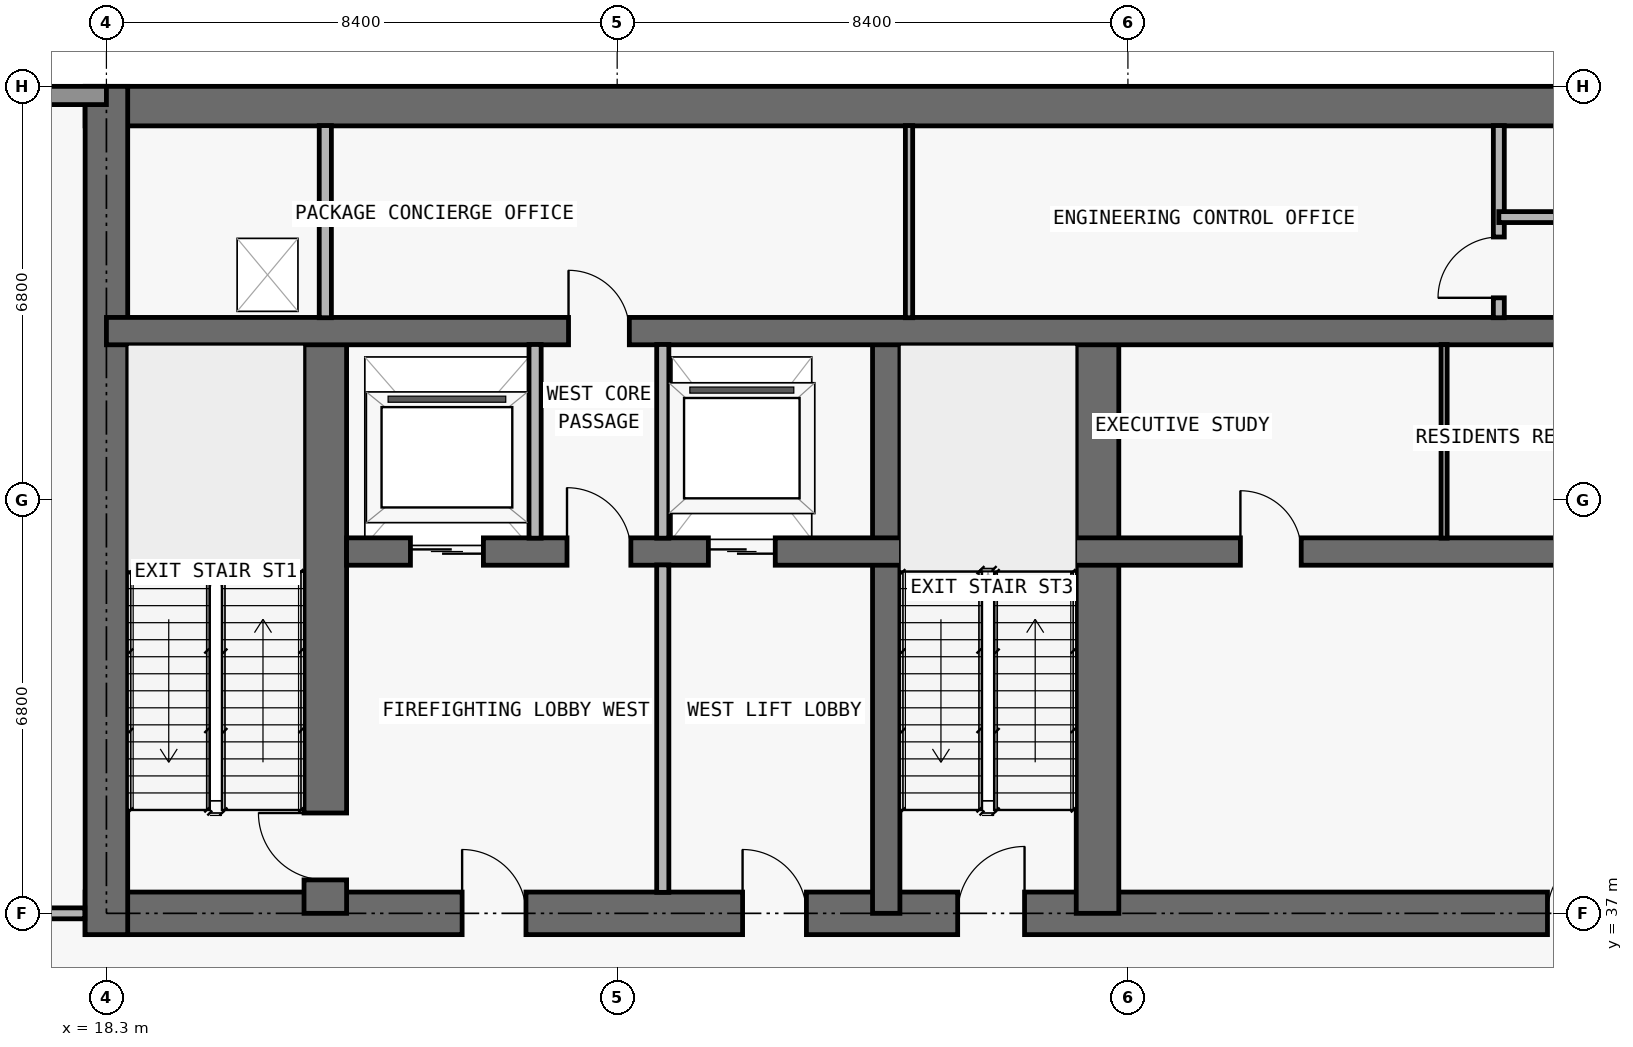
"""IFC4 building model, lengths in metres.
Left out: names, types, materials, properties, quantities, classifications, styles, units other than length and angle.
Written with IfcOpenShell. Run it as: python <this file> out.ifc"""

import sys

from ifc_helpers import new_model, si_unit, direction, frame, frame_2d, origin, place, context, subcontext, project, spatial, rectangle, extrude, element, fill, save


model = new_model("IFC4")
c1 = context("Model", 3, precision=1e-05, world=origin(), true_north=direction((0.0, 1.0)))
c2 = subcontext(c1, "Body", "Model", "MODEL_VIEW")
j1 = project(units=[si_unit("LENGTHUNIT", "METRE"), si_unit("PLANEANGLEUNIT", "RADIAN")], contexts=[c1])
p1 = place(None, origin())
s1 = spatial("IfcSite", under=j1, at=p1, CompositionType="ELEMENT")
p2 = place(p1, origin())
s2 = spatial("IfcBuilding", under=s1, at=p2, CompositionType="ELEMENT")
p3 = place(p2, frame((0.0, 0.0, 221.4)))
s3 = spatial("IfcBuildingStorey", under=s2, at=p3, CompositionType="ELEMENT", Elevation=221.4)
p4 = place(p3, frame((17.95, 37.0, 0.0), z_axis=(0.0, 0.0, 1.0), x_axis=(1.0, 0.0, 0.0)))
e1 = element("IfcWall", 1, at=p4, inside=s3, PredefinedType="SHEAR", context=c2, shape_type="SweptSolid", body=[
    extrude(rectangle(XDim=41.9, YDim=0.7, at=frame_2d((20.95, 0.0))), origin(), (0.0, 0.0, 1.0), 4.85),
])
p5 = place(p4, frame((14.35, 0.0, 0.0)))
e2 = element("IfcOpeningElement", 2, at=p5, cuts=e1, PredefinedType="OPENING", context=c2, shape_type="SweptSolid", body=[
    extrude(rectangle(XDim=1.1, YDim=2.15, at=frame_2d((0.55, 1.075))), frame((0.0, 0.36, 0.0), z_axis=(0.0, -1.0, 0.0), x_axis=(1.0, 0.0, 0.0)), (0.0, 0.0, 1.0), 0.72),
])
p6 = place(p4, frame((6.2, 0.0, 0.0)))
e3 = element("IfcOpeningElement", 3, at=p6, cuts=e1, PredefinedType="OPENING", context=c2, shape_type="SweptSolid", body=[
    extrude(rectangle(XDim=1.05, YDim=2.15, at=frame_2d((0.525, 1.075))), frame((0.0, 0.36, 0.0), z_axis=(0.0, -1.0, 0.0), x_axis=(1.0, 0.0, 0.0)), (0.0, 0.0, 1.0), 0.72),
])
p7 = place(p4, frame((34.7, 0.0, 0.0)))
e4 = element("IfcOpeningElement", 4, at=p7, cuts=e1, PredefinedType="OPENING", context=c2, shape_type="SweptSolid", body=[
    extrude(rectangle(XDim=1.05, YDim=2.15, at=frame_2d((0.525, 1.075))), frame((0.0, 0.36, 0.0), z_axis=(0.0, -1.0, 0.0), x_axis=(1.0, 0.0, 0.0)), (0.0, 0.0, 1.0), 0.72),
])
p8 = place(p4, frame((10.812, 0.0, 0.0)))
e5 = element("IfcOpeningElement", 5, at=p8, cuts=e1, PredefinedType="OPENING", context=c2, shape_type="SweptSolid", body=[
    extrude(rectangle(XDim=1.05, YDim=2.15, at=frame_2d((0.525, 1.075))), frame((0.0, 0.36, 0.0), z_axis=(0.0, -1.0, 0.0), x_axis=(1.0, 0.0, 0.0)), (0.0, 0.0, 1.0), 0.72),
])
p9 = place(p4, frame((24.05, 0.0, 0.0)))
e6 = element("IfcOpeningElement", 6, at=p9, cuts=e1, PredefinedType="OPENING", context=c2, shape_type="SweptSolid", body=[
    extrude(rectangle(XDim=1.05, YDim=2.15, at=frame_2d((0.525, 1.075))), frame((0.0, 0.36, 0.0), z_axis=(0.0, -1.0, 0.0), x_axis=(1.0, 0.0, 0.0)), (0.0, 0.0, 1.0), 0.72),
])
p10 = place(p3, frame((17.95, 50.275, 0.0), z_axis=(0.0, 0.0, 1.0), x_axis=(1.0, 0.0, 0.0)))
e7 = element("IfcWall", 7, at=p10, inside=s3, PredefinedType="SHEAR", context=c2, shape_type="SweptSolid", body=[
    extrude(rectangle(XDim=41.9, YDim=0.65, at=frame_2d((20.95, 0.0))), origin(), (0.0, 0.0, 1.0), 4.85),
])
p11 = place(p3, frame((18.3, 36.65, 0.0), z_axis=(0.0, 0.0, 1.0), x_axis=(0.0, 1.0, 0.0)))
e8 = element("IfcWall", 8, at=p11, inside=s3, PredefinedType="SHEAR", context=c2, shape_type="SweptSolid", body=[
    extrude(rectangle(XDim=13.95, YDim=0.7, at=frame_2d((6.975, 0.0))), origin(), (0.0, 0.0, 1.0), 4.85),
])
p12 = place(p3, frame((21.9, 37.0, 0.0), z_axis=(0.0, 0.0, 1.0), x_axis=(0.0, 1.0, 0.0)))
e9 = element("IfcWall", 9, at=p12, inside=s3, PredefinedType="SHEAR", context=c2, shape_type="SweptSolid", body=[
    extrude(rectangle(XDim=9.575, YDim=0.7, at=frame_2d((4.788, 0.0))), origin(), (0.0, 0.0, 1.0), 4.85),
])
p13 = place(p12, frame((0.55, 0.0, 0.0)))
e10 = element("IfcOpeningElement", 10, at=p13, cuts=e9, PredefinedType="OPENING", context=c2, shape_type="SweptSolid", body=[
    extrude(rectangle(XDim=1.1, YDim=2.15, at=frame_2d((0.55, 1.075))), frame((0.0, 0.36, 0.0), z_axis=(0.0, -1.0, 0.0), x_axis=(1.0, 0.0, 0.0)), (0.0, 0.0, 1.0), 0.72),
])
p14 = place(p3, frame((31.125, 37.0, 0.0), z_axis=(0.0, 0.0, 1.0), x_axis=(0.0, 1.0, 0.0)))
e11 = element("IfcWall", 11, at=p14, inside=s3, PredefinedType="SHEAR", context=c2, shape_type="SweptSolid", body=[
    extrude(rectangle(XDim=9.575, YDim=0.45, at=frame_2d((4.788, 0.0))), origin(), (0.0, 0.0, 1.0), 4.85),
])
p15 = place(p3, frame((34.6, 37.0, 0.0), z_axis=(0.0, 0.0, 1.0), x_axis=(0.0, 1.0, 0.0)))
e12 = element("IfcWall", 12, at=p15, inside=s3, PredefinedType="SHEAR", context=c2, shape_type="SweptSolid", body=[
    extrude(rectangle(XDim=9.575, YDim=0.7, at=frame_2d((4.788, 0.0))), origin(), (0.0, 0.0, 1.0), 4.85),
])
p16 = place(p3, frame((22.25, 42.95, 0.0), z_axis=(0.0, 0.0, 1.0), x_axis=(1.0, 0.0, 0.0)))
e13 = element("IfcWall", 13, at=p16, inside=s3, PredefinedType="SHEAR", context=c2, shape_type="SweptSolid", body=[
    extrude(rectangle(XDim=33.3, YDim=0.45, at=frame_2d((16.65, 0.0))), origin(), (0.0, 0.0, 1.0), 4.85),
])
p17 = place(p16, frame((1.05, 0.0, 0.0)))
e14 = element("IfcOpeningElement", 14, at=p17, cuts=e13, PredefinedType="OPENING", context=c2, shape_type="SweptSolid", body=[
    extrude(rectangle(XDim=1.2, YDim=2.2, at=frame_2d((0.6, 1.1))), frame((0.0, 0.235, 0.0), z_axis=(0.0, -1.0, 0.0), x_axis=(1.0, 0.0, 0.0)), (0.0, 0.0, 1.0), 0.47),
])
p18 = place(p16, frame((31.05, 0.0, 0.0)))
e15 = element("IfcOpeningElement", 15, at=p18, cuts=e13, PredefinedType="OPENING", context=c2, shape_type="SweptSolid", body=[
    extrude(rectangle(XDim=1.2, YDim=2.2, at=frame_2d((0.6, 1.1))), frame((0.0, 0.235, 0.0), z_axis=(0.0, -1.0, 0.0), x_axis=(1.0, 0.0, 0.0)), (0.0, 0.0, 1.0), 0.47),
])
p19 = place(p16, frame((26.45, 0.0, 0.0)))
e16 = element("IfcOpeningElement", 16, at=p19, cuts=e13, PredefinedType="OPENING", context=c2, shape_type="SweptSolid", body=[
    extrude(rectangle(XDim=1.1, YDim=2.2, at=frame_2d((0.55, 1.1))), frame((0.0, 0.235, 0.0), z_axis=(0.0, -1.0, 0.0), x_axis=(1.0, 0.0, 0.0)), (0.0, 0.0, 1.0), 0.47),
])
p20 = place(p16, frame((5.95, 0.0, 0.0)))
e17 = element("IfcOpeningElement", 17, at=p20, cuts=e13, PredefinedType="OPENING", context=c2, shape_type="SweptSolid", body=[
    extrude(rectangle(XDim=1.1, YDim=2.2, at=frame_2d((0.55, 1.1))), frame((0.0, 0.235, 0.0), z_axis=(0.0, -1.0, 0.0), x_axis=(1.0, 0.0, 0.0)), (0.0, 0.0, 1.0), 0.47),
])
p21 = place(p16, frame((3.625, 0.0, 0.0)))
e18 = element("IfcOpeningElement", 18, at=p21, cuts=e13, PredefinedType="OPENING", context=c2, shape_type="SweptSolid", body=[
    extrude(rectangle(XDim=1.05, YDim=2.15, at=frame_2d((0.525, 1.075))), frame((0.0, 0.235, 0.0), z_axis=(0.0, -1.0, 0.0), x_axis=(1.0, 0.0, 0.0)), (0.0, 0.0, 1.0), 0.47),
])
p22 = place(p16, frame((28.675, 0.0, 0.0)))
e19 = element("IfcOpeningElement", 19, at=p22, cuts=e13, PredefinedType="OPENING", context=c2, shape_type="SweptSolid", body=[
    extrude(rectangle(XDim=1.05, YDim=2.15, at=frame_2d((0.525, 1.075))), frame((0.0, 0.235, 0.0), z_axis=(0.0, -1.0, 0.0), x_axis=(1.0, 0.0, 0.0)), (0.0, 0.0, 1.0), 0.47),
])
p23 = place(p16, frame((14.7, 0.0, 0.0)))
e20 = element("IfcOpeningElement", 20, at=p23, cuts=e13, PredefinedType="OPENING", context=c2, shape_type="SweptSolid", body=[
    extrude(rectangle(XDim=1.0, YDim=2.2, at=frame_2d((0.5, 1.1))), frame((0.0, 0.235, 0.0), z_axis=(0.0, -1.0, 0.0), x_axis=(1.0, 0.0, 0.0)), (0.0, 0.0, 1.0), 0.47),
])
p24 = place(p16, frame((21.45, 0.0, 0.0)))
e21 = element("IfcOpeningElement", 21, at=p24, cuts=e13, PredefinedType="OPENING", context=c2, shape_type="SweptSolid", body=[
    extrude(rectangle(XDim=1.0, YDim=2.2, at=frame_2d((0.5, 1.1))), frame((0.0, 0.235, 0.0), z_axis=(0.0, -1.0, 0.0), x_axis=(1.0, 0.0, 0.0)), (0.0, 0.0, 1.0), 0.47),
])
p25 = place(p3, frame((18.3, 46.575, 0.0), z_axis=(0.0, 0.0, 1.0), x_axis=(1.0, 0.0, 0.0)))
e22 = element("IfcWall", 22, at=p25, inside=s3, PredefinedType="SHEAR", context=c2, shape_type="SweptSolid", body=[
    extrude(rectangle(XDim=41.2, YDim=0.45, at=frame_2d((20.6, 0.0))), origin(), (0.0, 0.0, 1.0), 4.85),
])
p26 = place(p25, frame((7.6, 0.0, 0.0)))
e23 = element("IfcOpeningElement", 23, at=p26, cuts=e22, PredefinedType="OPENING", context=c2, shape_type="SweptSolid", body=[
    extrude(rectangle(XDim=1.0, YDim=2.2, at=frame_2d((0.5, 1.1))), frame((0.0, 0.235, 0.0), z_axis=(0.0, -1.0, 0.0), x_axis=(1.0, 0.0, 0.0)), (0.0, 0.0, 1.0), 0.47),
])
p27 = place(p25, frame((32.625, 0.0, 0.0)))
e24 = element("IfcOpeningElement", 24, at=p27, cuts=e22, PredefinedType="OPENING", context=c2, shape_type="SweptSolid", body=[
    extrude(rectangle(XDim=1.05, YDim=2.15, at=frame_2d((0.525, 1.075))), frame((0.0, 0.235, 0.0), z_axis=(0.0, -1.0, 0.0), x_axis=(1.0, 0.0, 0.0)), (0.0, 0.0, 1.0), 0.47),
])
p28 = place(p3, frame((10.1, 50.45, 0.0), z_axis=(0.0, 0.0, 1.0), x_axis=(1.0, 0.0, 0.0)))
e25 = element("IfcWall", 25, at=p28, inside=s3, PredefinedType="STANDARD", context=c2, shape_type="SweptSolid", body=[
    extrude(rectangle(XDim=8.2, YDim=0.3, at=frame_2d((4.1, 0.0))), origin(), (0.0, 0.0, 1.0), 4.85),
])
p29 = place(p28, frame((3.0, 0.0, 0.85)))
e26 = element("IfcOpeningElement", 26, at=p29, cuts=e25, PredefinedType="OPENING", context=c2, shape_type="SweptSolid", body=[
    extrude(rectangle(XDim=2.2, YDim=1.55, at=frame_2d((1.1, 0.775))), frame((0.0, 0.16, 0.0), z_axis=(0.0, -1.0, 0.0), x_axis=(1.0, 0.0, 0.0)), (0.0, 0.0, 1.0), 0.32),
])
p30 = place(p3, frame((21.9, 46.795, 0.0), z_axis=(0.0, 0.0, 1.0), x_axis=(0.0, 1.0, 0.0)))
e27 = element("IfcWall", 27, at=p30, inside=s3, PredefinedType="PARTITIONING", context=c2, shape_type="SweptSolid", body=[
    extrude(rectangle(XDim=3.16, YDim=0.2, at=frame_2d((1.58, 0.0))), origin(), (0.0, 0.0, 1.0), 4.85),
])
p31 = place(p3, frame((25.35, 43.17, 0.0), z_axis=(0.0, 0.0, 1.0), x_axis=(0.0, 1.0, 0.0)))
e28 = element("IfcWall", 28, at=p31, inside=s3, PredefinedType="PARTITIONING", context=c2, shape_type="SweptSolid", body=[
    extrude(rectangle(XDim=3.185, YDim=0.2, at=frame_2d((1.593, 0.0))), origin(), (0.0, 0.0, 1.0), 4.85),
])
p32 = place(p3, frame((27.45, 37.345, 0.0), z_axis=(0.0, 0.0, 1.0), x_axis=(0.0, 1.0, 0.0)))
e29 = element("IfcWall", 29, at=p32, inside=s3, PredefinedType="PARTITIONING", context=c2, shape_type="SweptSolid", body=[
    extrude(rectangle(XDim=5.385, YDim=0.2, at=frame_2d((2.692, 0.0))), origin(), (0.0, 0.0, 1.0), 4.85),
])
p33 = place(p3, frame((27.45, 43.17, 0.0), z_axis=(0.0, 0.0, 1.0), x_axis=(0.0, 1.0, 0.0)))
e30 = element("IfcWall", 30, at=p33, inside=s3, PredefinedType="PARTITIONING", context=c2, shape_type="SweptSolid", body=[
    extrude(rectangle(XDim=3.185, YDim=0.2, at=frame_2d((1.593, 0.0))), origin(), (0.0, 0.0, 1.0), 4.85),
])
p34 = place(p3, frame((31.5, 46.795, 0.0), z_axis=(0.0, 0.0, 1.0), x_axis=(0.0, 1.0, 0.0)))
e31 = element("IfcWall", 31, at=p34, inside=s3, PredefinedType="PARTITIONING", context=c2, shape_type="SweptSolid", body=[
    extrude(rectangle(XDim=3.16, YDim=0.12, at=frame_2d((1.58, 0.0))), origin(), (0.0, 0.0, 1.0), 4.85),
])
p35 = place(p3, frame((40.3, 43.17, 0.0), z_axis=(0.0, 0.0, 1.0), x_axis=(0.0, 1.0, 0.0)))
e32 = element("IfcWall", 32, at=p35, inside=s3, PredefinedType="MOVABLE", context=c2, shape_type="SweptSolid", body=[
    extrude(rectangle(XDim=3.185, YDim=0.1, at=frame_2d((1.593, 0.0))), origin(), (0.0, 0.0, 1.0), 4.85),
])
p36 = place(p3, frame((41.2, 46.795, 0.0), z_axis=(0.0, 0.0, 1.0), x_axis=(0.0, 1.0, 0.0)))
e33 = element("IfcWall", 33, at=p36, inside=s3, PredefinedType="PARTITIONING", context=c2, shape_type="SweptSolid", body=[
    extrude(rectangle(XDim=3.16, YDim=0.18, at=frame_2d((1.58, 0.0))), origin(), (0.0, 0.0, 1.0), 4.85),
])
p37 = place(p36, frame((0.327, 0.0, 0.0)))
e34 = element("IfcOpeningElement", 34, at=p37, cuts=e33, PredefinedType="OPENING", context=c2, shape_type="SweptSolid", body=[
    extrude(rectangle(XDim=1.0, YDim=2.2, at=frame_2d((0.5, 1.1))), frame((0.0, 0.1, 0.0), z_axis=(0.0, -1.0, 0.0), x_axis=(1.0, 0.0, 0.0)), (0.0, 0.0, 1.0), 0.2),
])
p38 = place(p3, frame((10.1, 37.0, 0.0), z_axis=(0.0, 0.0, 1.0), x_axis=(1.0, 0.0, 0.0)))
e35 = element("IfcWall", 35, at=p38, inside=s3, PredefinedType="PARTITIONING", context=c2, shape_type="SweptSolid", body=[
    extrude(rectangle(XDim=7.845, YDim=0.18, at=frame_2d((3.922, 0.0))), origin(), (0.0, 0.0, 1.0), 4.85),
])
p39 = place(p38, frame((3.323, 0.0, 0.0)))
e36 = element("IfcOpeningElement", 36, at=p39, cuts=e35, PredefinedType="OPENING", context=c2, shape_type="SweptSolid", body=[
    extrude(rectangle(XDim=1.2, YDim=2.2, at=frame_2d((0.6, 1.1))), frame((0.0, 0.1, 0.0), z_axis=(0.0, -1.0, 0.0), x_axis=(1.0, 0.0, 0.0)), (0.0, 0.0, 1.0), 0.2),
])
p40 = place(p3, frame((41.2, 48.45, 0.0), z_axis=(0.0, 0.0, 1.0), x_axis=(1.0, 0.0, 0.0)))
e37 = element("IfcWall", 37, at=p40, inside=s3, PredefinedType="PARTITIONING", context=c2, shape_type="SweptSolid", body=[
    extrude(rectangle(XDim=14.7, YDim=0.18, at=frame_2d((7.35, 0.0))), origin(), (0.0, 0.0, 1.0), 4.85),
])
p41 = place(p40, frame((1.85, 0.0, 0.0)))
e38 = element("IfcOpeningElement", 38, at=p41, cuts=e37, PredefinedType="OPENING", context=c2, shape_type="SweptSolid", body=[
    extrude(rectangle(XDim=1.2, YDim=2.2, at=frame_2d((0.6, 1.1))), frame((0.0, 0.1, 0.0), z_axis=(0.0, -1.0, 0.0), x_axis=(1.0, 0.0, 0.0)), (0.0, 0.0, 1.0), 0.2),
])
p42 = place(p40, frame((6.75, 0.0, 0.0)))
e39 = element("IfcOpeningElement", 39, at=p42, cuts=e37, PredefinedType="OPENING", context=c2, shape_type="SweptSolid", body=[
    extrude(rectangle(XDim=1.2, YDim=2.2, at=frame_2d((0.6, 1.1))), frame((0.0, 0.1, 0.0), z_axis=(0.0, -1.0, 0.0), x_axis=(1.0, 0.0, 0.0)), (0.0, 0.0, 1.0), 0.2),
])
p43 = place(p40, frame((11.825, 0.0, 0.0)))
e40 = element("IfcOpeningElement", 40, at=p43, cuts=e37, PredefinedType="OPENING", context=c2, shape_type="SweptSolid", body=[
    extrude(rectangle(XDim=0.85, YDim=2.1, at=frame_2d((0.425, 1.05))), frame((0.0, 0.1, 0.0), z_axis=(0.0, -1.0, 0.0), x_axis=(1.0, 0.0, 0.0)), (0.0, 0.0, 1.0), 0.2),
])
p44 = place(p17, origin())
e41 = element("IfcDoor", 41, at=p44, inside=s3, OperationType="DOUBLE_DOOR_SLIDING", PredefinedType="DOOR", context=c2, shape_type="SweptSolid", body=[
    extrude(rectangle(XDim=1.2, YDim=2.2, at=frame_2d((0.6, 1.1))), frame((0.0, 0.025, 0.0), z_axis=(0.0, -1.0, 0.0), x_axis=(1.0, 0.0, 0.0)), (0.0, 0.0, 1.0), 0.05),
])
fill(e14, e41)
p45 = place(p20, origin())
e42 = element("IfcDoor", 42, at=p45, inside=s3, OperationType="DOUBLE_DOOR_SLIDING", PredefinedType="DOOR", context=c2, shape_type="SweptSolid", body=[
    extrude(rectangle(XDim=1.1, YDim=2.2, at=frame_2d((0.55, 1.1))), frame((0.0, 0.025, 0.0), z_axis=(0.0, -1.0, 0.0), x_axis=(1.0, 0.0, 0.0)), (0.0, 0.0, 1.0), 0.05),
])
fill(e17, e42)
p46 = place(p5, origin())
e43 = element("IfcDoor", 43, at=p46, inside=s3, OperationType="SINGLE_SWING_RIGHT", PredefinedType="DOOR", context=c2, shape_type="SweptSolid", body=[
    extrude(rectangle(XDim=1.1, YDim=2.15, at=frame_2d((0.55, 1.075))), frame((0.0, 0.025, 0.0), z_axis=(0.0, -1.0, 0.0), x_axis=(1.0, 0.0, 0.0)), (0.0, 0.0, 1.0), 0.05),
])
fill(e2, e43)
p47 = place(p6, origin())
e44 = element("IfcDoor", 44, at=p47, inside=s3, OperationType="SINGLE_SWING_LEFT", PredefinedType="DOOR", context=c2, shape_type="SweptSolid", body=[
    extrude(rectangle(XDim=1.05, YDim=2.15, at=frame_2d((0.525, 1.075))), frame((0.0, 0.025, 0.0), z_axis=(0.0, -1.0, 0.0), x_axis=(1.0, 0.0, 0.0)), (0.0, 0.0, 1.0), 0.05),
])
fill(e3, e44)
p48 = place(p13, origin())
e45 = element("IfcDoor", 45, at=p48, inside=s3, OperationType="SINGLE_SWING_RIGHT", PredefinedType="DOOR", context=c2, shape_type="SweptSolid", body=[
    extrude(rectangle(XDim=1.1, YDim=2.15, at=frame_2d((0.55, 1.075))), frame((0.0, 0.025, 0.0), z_axis=(0.0, -1.0, 0.0), x_axis=(1.0, 0.0, 0.0)), (0.0, 0.0, 1.0), 0.05),
])
fill(e10, e45)
p49 = place(p21, origin())
e46 = element("IfcDoor", 46, at=p49, inside=s3, OperationType="SINGLE_SWING_LEFT", PredefinedType="DOOR", context=c2, shape_type="SweptSolid", body=[
    extrude(rectangle(XDim=1.05, YDim=2.15, at=frame_2d((0.525, 1.075))), frame((0.0, 0.025, 0.0), z_axis=(0.0, -1.0, 0.0), x_axis=(1.0, 0.0, 0.0)), (0.0, 0.0, 1.0), 0.05),
])
fill(e18, e46)
p50 = place(p8, origin())
e47 = element("IfcDoor", 47, at=p50, inside=s3, OperationType="SINGLE_SWING_LEFT", PredefinedType="DOOR", context=c2, shape_type="SweptSolid", body=[
    extrude(rectangle(XDim=1.05, YDim=2.15, at=frame_2d((0.525, 1.075))), frame((0.0, 0.025, 0.0), z_axis=(0.0, -1.0, 0.0), x_axis=(1.0, 0.0, 0.0)), (0.0, 0.0, 1.0), 0.05),
])
fill(e5, e47)
p51 = place(p9, origin())
e48 = element("IfcDoor", 48, at=p51, inside=s3, OperationType="SINGLE_SWING_RIGHT", PredefinedType="DOOR", context=c2, shape_type="SweptSolid", body=[
    extrude(rectangle(XDim=1.05, YDim=2.15, at=frame_2d((0.525, 1.075))), frame((0.0, 0.025, 0.0), z_axis=(0.0, -1.0, 0.0), x_axis=(1.0, 0.0, 0.0)), (0.0, 0.0, 1.0), 0.05),
])
fill(e6, e48)
p52 = place(p23, origin())
e49 = element("IfcDoor", 49, at=p52, inside=s3, OperationType="SINGLE_SWING_LEFT", PredefinedType="DOOR", context=c2, shape_type="SweptSolid", body=[
    extrude(rectangle(XDim=1.0, YDim=2.2, at=frame_2d((0.5, 1.1))), frame((0.0, 0.025, 0.0), z_axis=(0.0, -1.0, 0.0), x_axis=(1.0, 0.0, 0.0)), (0.0, 0.0, 1.0), 0.05),
])
fill(e20, e49)
p53 = place(p26, origin())
e50 = element("IfcDoor", 50, at=p53, inside=s3, OperationType="SINGLE_SWING_LEFT", PredefinedType="DOOR", context=c2, shape_type="SweptSolid", body=[
    extrude(rectangle(XDim=1.0, YDim=2.2, at=frame_2d((0.5, 1.1))), frame((0.0, 0.025, 0.0), z_axis=(0.0, -1.0, 0.0), x_axis=(1.0, 0.0, 0.0)), (0.0, 0.0, 1.0), 0.05),
])
fill(e23, e50)
p54 = place(p37, origin())
e51 = element("IfcDoor", 51, at=p54, inside=s3, OperationType="SINGLE_SWING_LEFT", PredefinedType="DOOR", context=c2, shape_type="SweptSolid", body=[
    extrude(rectangle(XDim=1.0, YDim=2.2, at=frame_2d((0.5, 1.1))), frame((0.0, 0.025, 0.0), z_axis=(0.0, -1.0, 0.0), x_axis=(1.0, 0.0, 0.0)), (0.0, 0.0, 1.0), 0.05),
])
fill(e34, e51)
save(model, sys.argv[1])
